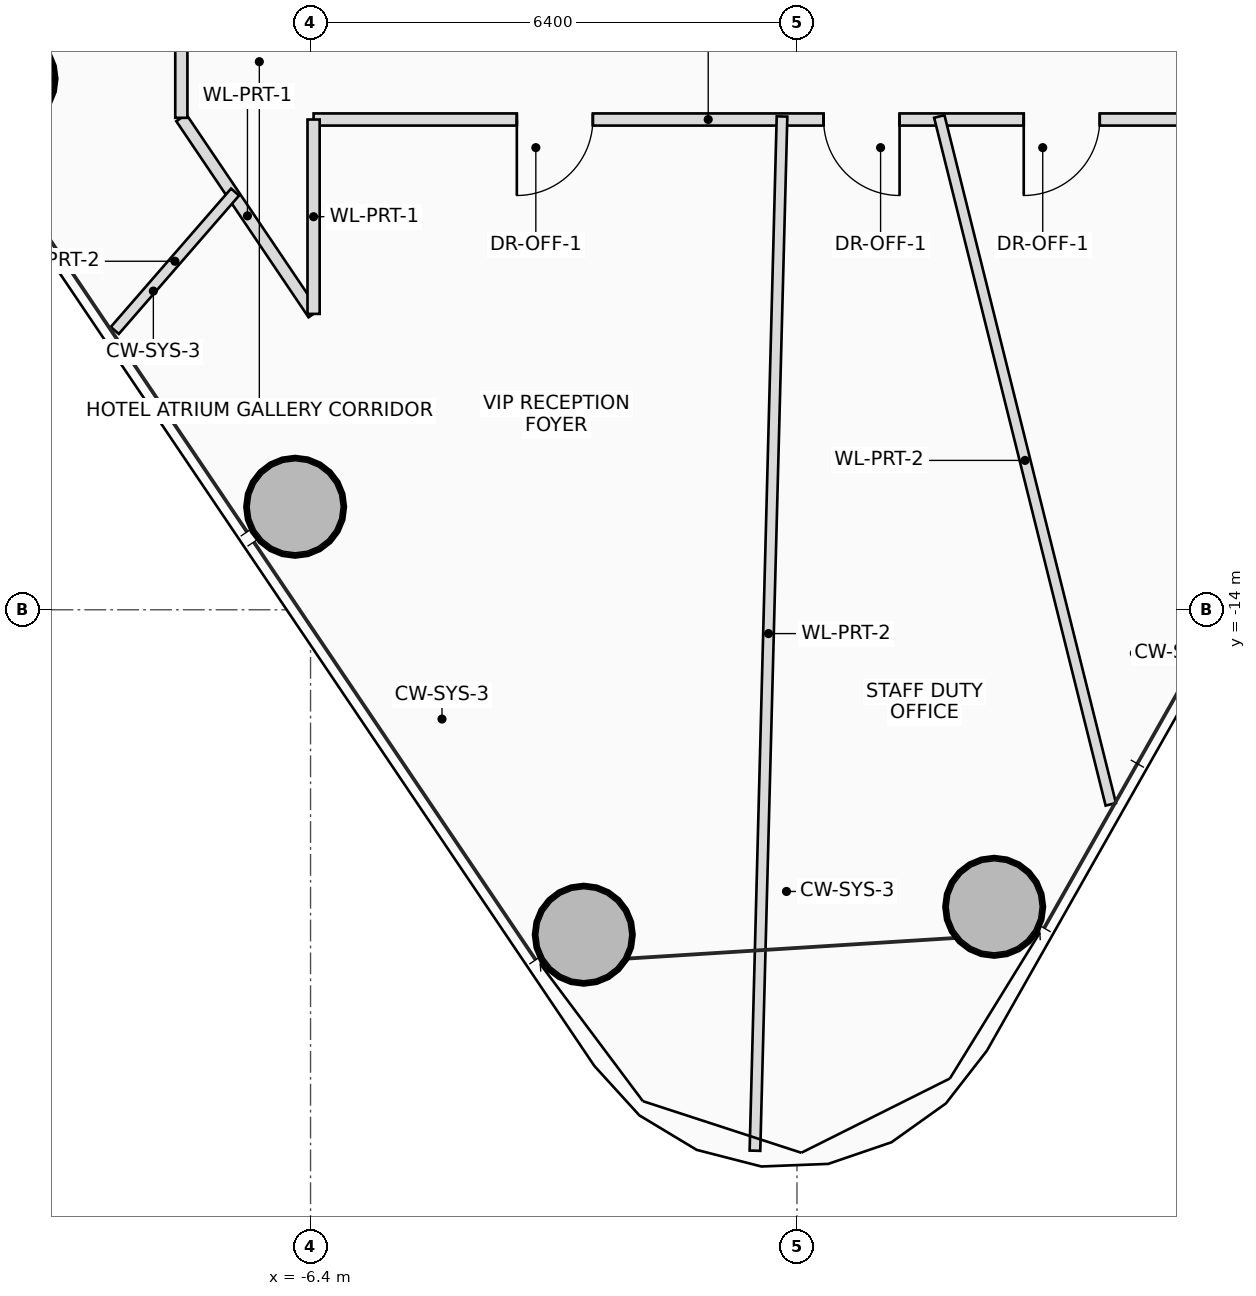
"""IFC4 building model, lengths in metres.
Left out: names, types, materials, properties, quantities, classifications, styles, units other than length and angle.
Written with IfcOpenShell. Run it as: python <this file> out.ifc"""

import sys

from ifc_helpers import new_model, si_unit, direction, frame, frame_2d, origin, origin_2d, place, context, subcontext, project, spatial, rectangle, hollow_circle, extrude, source, transform, mapped, element, fill, save


model = new_model("IFC4")
c1 = context("Model", 3, precision=1e-05, world=origin(), true_north=direction((0.0, 1.0)))
c2 = subcontext(c1, "Body", "Model", "MODEL_VIEW")
j1 = project(units=[si_unit("LENGTHUNIT", "METRE"), si_unit("PLANEANGLEUNIT", "RADIAN")], contexts=[c1])
p1 = place(None, origin())
s1 = spatial("IfcSite", under=j1, at=p1, CompositionType="ELEMENT")
p2 = place(p1, origin())
s2 = spatial("IfcBuilding", under=s1, at=p2, CompositionType="ELEMENT")
p3 = place(p2, frame((0.0, 0.0, 172.55)))
s3 = spatial("IfcBuildingStorey", under=s2, at=p3, CompositionType="ELEMENT", Elevation=172.55)
m1 = source(origin(), c2, "Body", "SweptSolid", [
    extrude(hollow_circle(Radius=0.65, WallThickness=0.045, at=origin_2d()), origin(), (0.0, 0.0, 1.0), 3.45),
])
for number, where, z_axis, x_axis in (
    (1, (2.595, -17.908, 0.0), (0.0, 0.0, 1.0), (1.0, 0.0, 0.0)),
    (2, (-10.4, -7.015, 0.0), (0.0, 0.0, 1.0), (1.0, 0.0, 0.0)),
    (3, (-6.603, -12.645, 0.0), (0.0, 0.0, 1.0), (1.0, 0.0, 0.0)),
    (4, (-2.805, -18.275, 0.0), (0.0, 0.0, 1.0), (1.0, 0.0, 0.0)),
):
    element("IfcColumn", number, at=place(p3, frame(where, z_axis=z_axis, x_axis=x_axis)), inside=s3, PredefinedType="COLUMN", context=c2, shape_type="MappedRepresentation", body=[
        mapped(m1, transform((0.0, 0.0, 0.0), scale=1.0)),
    ])
p4 = place(p3, frame((-6.36, -10.107, 0.0), z_axis=(0.0, 0.0, 1.0), x_axis=(-0.559200615657, 0.829032370567, 0.0)))
e5 = element("IfcWall", 5, at=p4, inside=s3, PredefinedType="PARTITIONING", context=c2, shape_type="SweptSolid", body=[
    extrude(rectangle(XDim=3.112, YDim=0.16, at=frame_2d((1.556, 0.0))), origin(), (0.0, 0.0, 1.0), 2.605),
])
p5 = place(p3, frame((-8.1, -7.528, 0.0), z_axis=(0.0, 0.0, 1.0), x_axis=(0.0, 1.0, 0.0)))
e6 = element("IfcWall", 6, at=p5, inside=s3, PredefinedType="PARTITIONING", context=c2, shape_type="SweptSolid", body=[
    extrude(rectangle(XDim=15.078, YDim=0.16, at=frame_2d((7.539, 0.0))), origin(), (0.0, 0.0, 1.0), 2.605),
])
p6 = place(p5, frame((3.265, 0.0, 0.0)))
e7 = element("IfcOpeningElement", 7, at=p6, cuts=e6, PredefinedType="OPENING", context=c2, shape_type="SweptSolid", body=[
    extrude(rectangle(XDim=0.9, YDim=2.05, at=frame_2d((0.45, 1.025))), frame((0.0, 0.09, 0.0), z_axis=(0.0, -1.0, 0.0), x_axis=(1.0, 0.0, 0.0)), (0.0, 0.0, 1.0), 0.18),
])
p7 = place(p5, frame((9.079, 0.0, 0.0)))
e8 = element("IfcOpeningElement", 8, at=p7, cuts=e6, PredefinedType="OPENING", context=c2, shape_type="SweptSolid", body=[
    extrude(rectangle(XDim=1.05, YDim=2.2, at=frame_2d((0.525, 1.1))), frame((0.0, 0.09, 0.0), z_axis=(0.0, -1.0, 0.0), x_axis=(1.0, 0.0, 0.0)), (0.0, 0.0, 1.0), 0.18),
])
p8 = place(p5, frame((12.91, 0.0, 0.0)))
e9 = element("IfcOpeningElement", 9, at=p8, cuts=e6, PredefinedType="OPENING", context=c2, shape_type="SweptSolid", body=[
    extrude(rectangle(XDim=1.05, YDim=2.2, at=frame_2d((0.525, 1.1))), frame((0.0, 0.09, 0.0), z_axis=(0.0, -1.0, 0.0), x_axis=(1.0, 0.0, 0.0)), (0.0, 0.0, 1.0), 0.18),
])
p9 = place(p3, frame((5.25, -7.55, 0.0), z_axis=(0.0, 0.0, 1.0), x_axis=(-1.0, 0.0, 0.0)))
e10 = element("IfcWall", 10, at=p9, inside=s3, PredefinedType="PARTITIONING", context=c2, shape_type="SweptSolid", body=[
    extrude(rectangle(XDim=11.61, YDim=0.16, at=frame_2d((5.805, 0.0))), origin(), (0.0, 0.0, 1.0), 2.605),
])
p10 = place(p9, frame((1.267, 0.0, 0.0)))
e11 = element("IfcOpeningElement", 11, at=p10, cuts=e10, PredefinedType="OPENING", context=c2, shape_type="SweptSolid", body=[
    extrude(rectangle(XDim=1.0, YDim=2.25, at=frame_2d((0.5, 1.125))), frame((0.0, 0.09, 0.0), z_axis=(0.0, -1.0, 0.0), x_axis=(1.0, 0.0, 0.0)), (0.0, 0.0, 1.0), 0.18),
])
p11 = place(p9, frame((3.9, 0.0, 0.0)))
e12 = element("IfcOpeningElement", 12, at=p11, cuts=e10, PredefinedType="OPENING", context=c2, shape_type="SweptSolid", body=[
    extrude(rectangle(XDim=1.0, YDim=2.25, at=frame_2d((0.5, 1.125))), frame((0.0, 0.09, 0.0), z_axis=(0.0, -1.0, 0.0), x_axis=(1.0, 0.0, 0.0)), (0.0, 0.0, 1.0), 0.18),
])
p12 = place(p9, frame((7.936, 0.0, 0.0)))
e13 = element("IfcOpeningElement", 13, at=p12, cuts=e10, PredefinedType="OPENING", context=c2, shape_type="SweptSolid", body=[
    extrude(rectangle(XDim=1.0, YDim=2.25, at=frame_2d((0.5, 1.125))), frame((0.0, 0.09, 0.0), z_axis=(0.0, -1.0, 0.0), x_axis=(1.0, 0.0, 0.0)), (0.0, 0.0, 1.0), 0.18),
])
p13 = place(p3, frame((-6.36, -7.55, 0.0), z_axis=(0.0, 0.0, 1.0), x_axis=(0.0, -1.0, 0.0)))
e14 = element("IfcWall", 14, at=p13, inside=s3, PredefinedType="PARTITIONING", context=c2, shape_type="SweptSolid", body=[
    extrude(rectangle(XDim=2.557, YDim=0.16, at=frame_2d((1.279, 0.0))), origin(), (0.0, 0.0, 1.0), 2.605),
])
p14 = place(p3, frame((-7.393, -8.505, 0.0), z_axis=(0.0, 0.0, 1.0), x_axis=(-0.656043394523, -0.754723170774, 0.0)))
e15 = element("IfcWall", 15, at=p14, inside=s3, PredefinedType="PARTITIONING", context=c2, shape_type="SweptSolid", body=[
    extrude(rectangle(XDim=2.412, YDim=0.14, at=frame_2d((1.206, 0.0))), origin(), (0.0, 0.0, 1.0), 2.765),
])
p15 = place(p3, frame((-0.197, -7.51, 0.0), z_axis=(0.0, 0.0, 1.0), x_axis=(-0.026169420715, -0.999657522064, 0.0)))
e16 = element("IfcWall", 16, at=p15, inside=s3, PredefinedType="PARTITIONING", context=c2, shape_type="SweptSolid", body=[
    extrude(rectangle(XDim=13.611, YDim=0.14, at=frame_2d((6.806, 0.0))), origin(), (0.0, 0.0, 1.0), 2.765),
])
p16 = place(p3, frame((1.873, -7.51, 0.0), z_axis=(0.0, 0.0, 1.0), x_axis=(0.241919667538, -0.970296281791, 0.0)))
e17 = element("IfcWall", 17, at=p16, inside=s3, PredefinedType="PARTITIONING", context=c2, shape_type="SweptSolid", body=[
    extrude(rectangle(XDim=9.327, YDim=0.14, at=frame_2d((4.664, 0.0))), origin(), (0.0, 0.0, 1.0), 2.605),
])
p17 = place(p10, origin())
e18 = element("IfcDoor", 18, at=p17, inside=s3, OperationType="SINGLE_SWING_RIGHT", PredefinedType="DOOR", context=c2, shape_type="SweptSolid", body=[
    extrude(rectangle(XDim=1.0, YDim=2.25, at=frame_2d((0.5, 1.125))), frame((0.0, 0.025, 0.0), z_axis=(0.0, -1.0, 0.0), x_axis=(1.0, 0.0, 0.0)), (0.0, 0.0, 1.0), 0.05),
])
fill(e11, e18)
p18 = place(p11, origin())
e19 = element("IfcDoor", 19, at=p18, inside=s3, OperationType="SINGLE_SWING_LEFT", PredefinedType="DOOR", context=c2, shape_type="SweptSolid", body=[
    extrude(rectangle(XDim=1.0, YDim=2.25, at=frame_2d((0.5, 1.125))), frame((0.0, 0.025, 0.0), z_axis=(0.0, -1.0, 0.0), x_axis=(1.0, 0.0, 0.0)), (0.0, 0.0, 1.0), 0.05),
])
fill(e12, e19)
p19 = place(p12, origin())
e20 = element("IfcDoor", 20, at=p19, inside=s3, OperationType="SINGLE_SWING_RIGHT", PredefinedType="DOOR", context=c2, shape_type="SweptSolid", body=[
    extrude(rectangle(XDim=1.0, YDim=2.25, at=frame_2d((0.5, 1.125))), frame((0.0, 0.025, 0.0), z_axis=(0.0, -1.0, 0.0), x_axis=(1.0, 0.0, 0.0)), (0.0, 0.0, 1.0), 0.05),
])
fill(e13, e20)
save(model, sys.argv[1])
